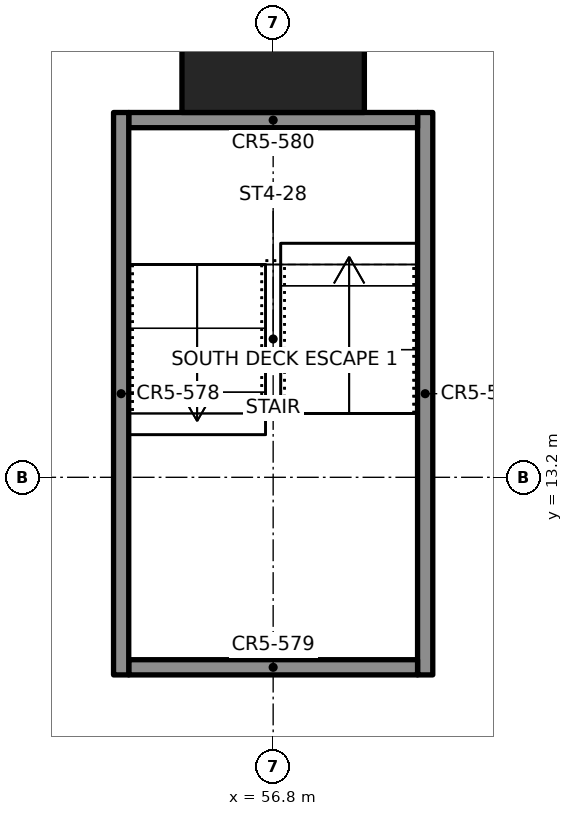
"""IFC4 building model, lengths in metres.
Left out: names, types, materials, properties, quantities, classifications, styles, units other than length and angle.
Written with IfcOpenShell. Run it as: python <this file> out.ifc"""

import sys

from ifc_helpers import new_model, si_unit, direction, frame, frame_2d, origin, origin_2d, place, context, subcontext, project, spatial, rectangle, extrude, element, save


model = new_model("IFC4")
c1 = context("Model", 3, precision=1e-05, world=origin(), true_north=direction((0.0, 1.0)))
c2 = subcontext(c1, "Body", "Model", "MODEL_VIEW")
j1 = project(units=[si_unit("LENGTHUNIT", "METRE"), si_unit("PLANEANGLEUNIT", "RADIAN")], contexts=[c1])
p1 = place(None, origin())
s1 = spatial("IfcSite", under=j1, at=p1, CompositionType="ELEMENT")
p2 = place(p1, origin())
s2 = spatial("IfcBuilding", under=s1, at=p2, CompositionType="ELEMENT")
p3 = place(p2, frame((0.0, 0.0, 8.8)))
s3 = spatial("IfcBuildingStorey", under=s2, at=p3, CompositionType="ELEMENT", Elevation=8.8)
p4 = place(p3, frame((56.8, 19.2, 0.0), z_axis=(0.0, 0.0, 1.0), x_axis=(1.0, 0.0, 0.0)))
e1 = element("IfcColumn", 1, at=p4, inside=s3, PredefinedType="COLUMN", context=c2, shape_type="SweptSolid", body=[
    extrude(rectangle(XDim=2.4, YDim=2.4, at=origin_2d()), origin(), (0.0, 0.0, 1.0), 3.65),
])
for number, where, z_axis, x_axis in (
    (2, (54.8, 10.6, 0.0), (0.0, 0.0, 1.0), (0.0, 1.0, 0.0)),
    (3, (58.8, 18.0, 0.0), (0.0, 0.0, 1.0), (0.0, -1.0, 0.0)),
):
    element("IfcWall", number, at=place(p3, frame(where, z_axis=z_axis, x_axis=x_axis)), inside=s3, PredefinedType="SOLIDWALL", context=c2, shape_type="SweptSolid", body=[
        extrude(rectangle(XDim=7.4, YDim=0.2, at=frame_2d((3.7, 0.0))), origin(), (0.0, 0.0, 1.0), 5.2),
    ])
for number, where, z_axis, x_axis in (
    (4, (54.9, 10.7, 0.0), (0.0, 0.0, 1.0), (1.0, 0.0, 0.0)),
    (5, (54.9, 17.9, 0.0), (0.0, 0.0, 1.0), (1.0, 0.0, 0.0)),
):
    element("IfcWall", number, at=place(p3, frame(where, z_axis=z_axis, x_axis=x_axis)), inside=s3, PredefinedType="SOLIDWALL", context=c2, shape_type="SweptSolid", body=[
        extrude(rectangle(XDim=3.8, YDim=0.2, at=frame_2d((1.9, 0.0))), origin(), (0.0, 0.0, 1.0), 5.2),
    ])
save(model, sys.argv[1])
